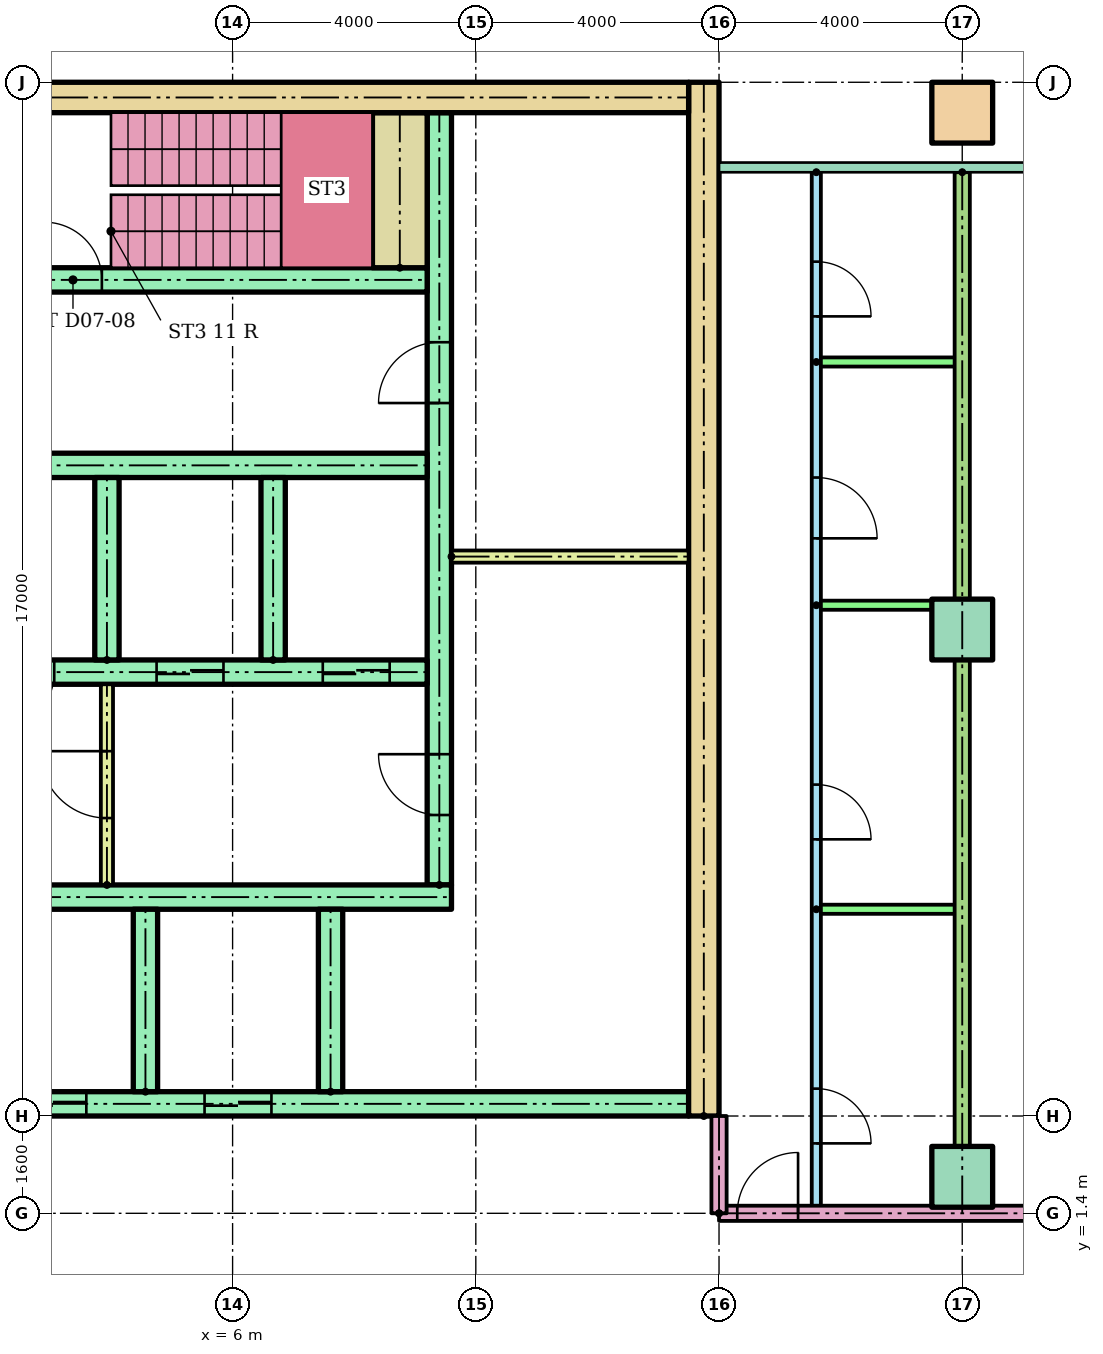
"""IFC4 building model, lengths in metres.
Left out: names, types, materials, properties, quantities, classifications, styles, units other than length and angle.
Written with IfcOpenShell. Run it as: python <this file> out.ifc"""

import sys

from ifc_helpers import new_model, si_unit, direction, frame, frame_2d, origin, origin_2d, place, context, subcontext, project, spatial, rectangle, hollow_rectangle, extrude, element, fill, save


model = new_model("IFC4")
c1 = context("Model", 3, precision=1e-05, world=origin(), true_north=direction((0.0, 1.0)))
c2 = subcontext(c1, "Body", "Model", "MODEL_VIEW")
j1 = project(units=[si_unit("LENGTHUNIT", "METRE"), si_unit("PLANEANGLEUNIT", "RADIAN")], contexts=[c1])
p1 = place(None, origin())
s1 = spatial("IfcSite", under=j1, at=p1, CompositionType="ELEMENT")
p2 = place(p1, origin())
s2 = spatial("IfcBuilding", under=s1, at=p2, CompositionType="ELEMENT")
p3 = place(p2, frame((0.0, 0.0, 29.9)))
s3 = spatial("IfcBuildingStorey", under=s2, at=p3, CompositionType="ELEMENT", Elevation=29.9)
for number, where in (
    (1, (18.0, 2.0, 0.0)),
    (2, (18.0, 11.0, 0.0)),
):
    element("IfcColumn", number, at=place(p3, frame(where)), inside=s3, PredefinedType="COLUMN", context=c2, shape_type="SweptSolid", body=[
        extrude(rectangle(XDim=1.0, YDim=1.0, at=origin_2d()), origin(), (0.0, 0.0, 1.0), 3.9),
    ])
p4 = place(p3, frame((18.0, 19.5, 0.0)))
e3 = element("IfcColumn", 3, at=p4, inside=s3, PredefinedType="COLUMN", context=c2, shape_type="SweptSolid", body=[
    extrude(hollow_rectangle(XDim=1.0, YDim=1.0, WallThickness=0.05, at=origin_2d()), origin(), (0.0, 0.0, 1.0), 3.9),
])
p5 = place(p3, frame((13.75, 3.0, 0.0), z_axis=(0.0, 0.0, 1.0), x_axis=(0.0, 1.0, 0.0)))
e4 = element("IfcWall", 4, at=p5, inside=s3, PredefinedType="SHEAR", context=c2, shape_type="SweptSolid", body=[
    extrude(rectangle(XDim=17.0, YDim=0.5, at=frame_2d((8.5, 0.0))), origin(), (0.0, 0.0, 1.0), 3.6),
])
p6 = place(p3, frame((-13.5, 19.75, 0.0)))
e5 = element("IfcWall", 5, at=p6, inside=s3, PredefinedType="SHEAR", context=c2, shape_type="SweptSolid", body=[
    extrude(rectangle(XDim=27.0, YDim=0.5, at=frame_2d((13.5, 0.0))), origin(), (0.0, 0.0, 1.0), 3.6),
])
p7 = place(p3, frame((9.4, 6.8, 0.0), z_axis=(0.0, 0.0, 1.0), x_axis=(0.0, 1.0, 0.0)))
e6 = element("IfcWall", 6, at=p7, inside=s3, PredefinedType="SHEAR", context=c2, shape_type="SweptSolid", body=[
    extrude(rectangle(XDim=12.7, YDim=0.4, at=frame_2d((6.35, 0.0))), origin(), (0.0, 0.0, 1.0), 3.6),
])
p8 = place(p7, frame((1.15, 0.0, 0.0)))
e7 = element("IfcOpeningElement", 7, at=p8, cuts=e6, PredefinedType="OPENING", context=c2, shape_type="SweptSolid", body=[
    extrude(rectangle(XDim=1.0, YDim=2.1, at=frame_2d((0.5, 1.05))), frame((0.0, 0.21, 0.0), z_axis=(0.0, -1.0, 0.0), x_axis=(1.0, 0.0, 0.0)), (0.0, 0.0, 1.0), 0.42),
])
p9 = place(p7, frame((7.925, 0.0, 0.0)))
e8 = element("IfcOpeningElement", 8, at=p9, cuts=e6, PredefinedType="OPENING", context=c2, shape_type="SweptSolid", body=[
    extrude(rectangle(XDim=1.0, YDim=2.1, at=frame_2d((0.5, 1.05))), frame((0.0, 0.21, 0.0), z_axis=(0.0, -1.0, 0.0), x_axis=(1.0, 0.0, 0.0)), (0.0, 0.0, 1.0), 0.42),
])
p10 = place(p3, frame((-13.5, 3.2, 0.0)))
e9 = element("IfcWall", 9, at=p10, inside=s3, PredefinedType="SHEAR", context=c2, shape_type="SweptSolid", body=[
    extrude(rectangle(XDim=27.0, YDim=0.4, at=frame_2d((13.5, 0.0))), origin(), (0.0, 0.0, 1.0), 3.6),
])
p11 = place(p10, frame((6.861, 0.0, 0.0)))
e10 = element("IfcOpeningElement", 10, at=p11, cuts=e9, PredefinedType="OPENING", context=c2, shape_type="SweptSolid", body=[
    extrude(rectangle(XDim=1.1, YDim=2.1, at=frame_2d((0.55, 1.05))), frame((0.0, 0.21, 0.0), z_axis=(0.0, -1.0, 0.0), x_axis=(1.0, 0.0, 0.0)), (0.0, 0.0, 1.0), 0.42),
])
p12 = place(p10, frame((9.906, 0.0, 0.0)))
e11 = element("IfcOpeningElement", 11, at=p12, cuts=e9, PredefinedType="OPENING", context=c2, shape_type="SweptSolid", body=[
    extrude(rectangle(XDim=1.1, YDim=2.1, at=frame_2d((0.55, 1.05))), frame((0.0, 0.21, 0.0), z_axis=(0.0, -1.0, 0.0), x_axis=(1.0, 0.0, 0.0)), (0.0, 0.0, 1.0), 0.42),
])
p13 = place(p10, frame((15.994, 0.0, 0.0)))
e12 = element("IfcOpeningElement", 12, at=p13, cuts=e9, PredefinedType="OPENING", context=c2, shape_type="SweptSolid", body=[
    extrude(rectangle(XDim=1.1, YDim=2.1, at=frame_2d((0.55, 1.05))), frame((0.0, 0.21, 0.0), z_axis=(0.0, -1.0, 0.0), x_axis=(1.0, 0.0, 0.0)), (0.0, 0.0, 1.0), 0.42),
])
p14 = place(p10, frame((19.039, 0.0, 0.0)))
e13 = element("IfcOpeningElement", 13, at=p14, cuts=e9, PredefinedType="OPENING", context=c2, shape_type="SweptSolid", body=[
    extrude(rectangle(XDim=1.1, YDim=2.1, at=frame_2d((0.55, 1.05))), frame((0.0, 0.21, 0.0), z_axis=(0.0, -1.0, 0.0), x_axis=(1.0, 0.0, 0.0)), (0.0, 0.0, 1.0), 0.42),
])
p15 = place(p10, frame((12.6, 0.0, 0.0)))
e14 = element("IfcOpeningElement", 14, at=p15, cuts=e9, PredefinedType="OPENING", context=c2, shape_type="SweptSolid", body=[
    extrude(rectangle(XDim=1.8, YDim=2.1, at=frame_2d((0.9, 1.05))), frame((0.0, 0.21, 0.0), z_axis=(0.0, -1.0, 0.0), x_axis=(1.0, 0.0, 0.0)), (0.0, 0.0, 1.0), 0.42),
])
p16 = place(p3, frame((1.522, 6.6, 0.0)))
e15 = element("IfcWall", 15, at=p16, inside=s3, PredefinedType="SHEAR", context=c2, shape_type="SweptSolid", body=[
    extrude(rectangle(XDim=8.078, YDim=0.4, at=frame_2d((4.039, 0.0))), origin(), (0.0, 0.0, 1.0), 3.6),
])
for number, where, z_axis, x_axis in (
    (16, (4.567, 3.4, 0.0), (0.0, 0.0, 1.0), (0.0, 1.0, 0.0)),
    (17, (7.611, 3.4, 0.0), (0.0, 0.0, 1.0), (0.0, 1.0, 0.0)),
):
    element("IfcWall", number, at=place(p3, frame(where, z_axis=z_axis, x_axis=x_axis)), inside=s3, PredefinedType="SHEAR", context=c2, shape_type="SweptSolid", body=[
        extrude(rectangle(XDim=3.0, YDim=0.4, at=frame_2d((1.5, 0.0))), origin(), (0.0, 0.0, 1.0), 3.6),
    ])
p17 = place(p3, frame((1.2, 10.3, 0.0)))
e18 = element("IfcWall", 18, at=p17, inside=s3, PredefinedType="SHEAR", context=c2, shape_type="SweptSolid", body=[
    extrude(rectangle(XDim=8.0, YDim=0.4, at=frame_2d((4.0, 0.0))), origin(), (0.0, 0.0, 1.0), 3.6),
])
p18 = place(p17, frame((3.55, 0.0, 0.0)))
e19 = element("IfcOpeningElement", 19, at=p18, cuts=e18, PredefinedType="OPENING", context=c2, shape_type="SweptSolid", body=[
    extrude(rectangle(XDim=1.1, YDim=2.1, at=frame_2d((0.55, 1.05))), frame((0.0, 0.21, 0.0), z_axis=(0.0, -1.0, 0.0), x_axis=(1.0, 0.0, 0.0)), (0.0, 0.0, 1.0), 0.42),
])
p19 = place(p17, frame((6.283, 0.0, 0.0)))
e20 = element("IfcOpeningElement", 20, at=p19, cuts=e18, PredefinedType="OPENING", context=c2, shape_type="SweptSolid", body=[
    extrude(rectangle(XDim=1.1, YDim=2.1, at=frame_2d((0.55, 1.05))), frame((0.0, 0.21, 0.0), z_axis=(0.0, -1.0, 0.0), x_axis=(1.0, 0.0, 0.0)), (0.0, 0.0, 1.0), 0.42),
])
p20 = place(p17, frame((0.867, 0.0, 0.0)))
e21 = element("IfcOpeningElement", 21, at=p20, cuts=e18, PredefinedType="OPENING", context=c2, shape_type="SweptSolid", body=[
    extrude(rectangle(XDim=1.0, YDim=2.1, at=frame_2d((0.5, 1.05))), frame((0.0, 0.21, 0.0), z_axis=(0.0, -1.0, 0.0), x_axis=(1.0, 0.0, 0.0)), (0.0, 0.0, 1.0), 0.42),
])
p21 = place(p3, frame((1.2, 13.7, 0.0)))
e22 = element("IfcWall", 22, at=p21, inside=s3, PredefinedType="SHEAR", context=c2, shape_type="SweptSolid", body=[
    extrude(rectangle(XDim=8.0, YDim=0.4, at=frame_2d((4.0, 0.0))), origin(), (0.0, 0.0, 1.0), 3.6),
])
for number, where, z_axis, x_axis in (
    (23, (3.933, 10.5, 0.0), (0.0, 0.0, 1.0), (0.0, 1.0, 0.0)),
    (24, (6.667, 10.5, 0.0), (0.0, 0.0, 1.0), (0.0, 1.0, 0.0)),
):
    element("IfcWall", number, at=place(p3, frame(where, z_axis=z_axis, x_axis=x_axis)), inside=s3, PredefinedType="SHEAR", context=c2, shape_type="SweptSolid", body=[
        extrude(rectangle(XDim=3.0, YDim=0.4, at=frame_2d((1.5, 0.0))), origin(), (0.0, 0.0, 1.0), 3.6),
    ])
p22 = place(p3, frame((3.933, 6.8, 0.0), z_axis=(0.0, 0.0, 1.0), x_axis=(0.0, 1.0, 0.0)))
e25 = element("IfcWall", 25, at=p22, inside=s3, PredefinedType="PARTITIONING", context=c2, shape_type="SweptSolid", body=[
    extrude(rectangle(XDim=3.3, YDim=0.2, at=frame_2d((1.65, 0.0))), origin(), (0.0, 0.0, 1.0), 3.6),
])
p23 = place(p22, frame((1.1, 0.0, 0.0)))
e26 = element("IfcOpeningElement", 26, at=p23, cuts=e25, PredefinedType="OPENING", context=c2, shape_type="SweptSolid", body=[
    extrude(rectangle(XDim=1.1, YDim=2.1, at=frame_2d((0.55, 1.05))), frame((0.0, 0.11, 0.0), z_axis=(0.0, -1.0, 0.0), x_axis=(1.0, 0.0, 0.0)), (0.0, 0.0, 1.0), 0.22),
])
p24 = place(p3, frame((-9.2, 16.75, 0.0)))
e27 = element("IfcWall", 27, at=p24, inside=s3, PredefinedType="SHEAR", context=c2, shape_type="SweptSolid", body=[
    extrude(rectangle(XDim=18.4, YDim=0.4, at=frame_2d((9.2, 0.0))), origin(), (0.0, 0.0, 1.0), 3.6),
])
p25 = place(p24, frame((0.1, 0.0, 0.0)))
e28 = element("IfcOpeningElement", 28, at=p25, cuts=e27, PredefinedType="OPENING", context=c2, shape_type="SweptSolid", body=[
    extrude(rectangle(XDim=0.95, YDim=2.1, at=frame_2d((0.475, 1.05))), frame((0.0, 0.21, 0.0), z_axis=(0.0, -1.0, 0.0), x_axis=(1.0, 0.0, 0.0)), (0.0, 0.0, 1.0), 0.42),
])
p26 = place(p24, frame((6.1, 0.0, 0.0)))
e29 = element("IfcOpeningElement", 29, at=p26, cuts=e27, PredefinedType="OPENING", context=c2, shape_type="SweptSolid", body=[
    extrude(rectangle(XDim=0.95, YDim=2.1, at=frame_2d((0.475, 1.05))), frame((0.0, 0.21, 0.0), z_axis=(0.0, -1.0, 0.0), x_axis=(1.0, 0.0, 0.0)), (0.0, 0.0, 1.0), 0.42),
])
p27 = place(p24, frame((12.1, 0.0, 0.0)))
e30 = element("IfcOpeningElement", 30, at=p27, cuts=e27, PredefinedType="OPENING", context=c2, shape_type="SweptSolid", body=[
    extrude(rectangle(XDim=0.95, YDim=2.1, at=frame_2d((0.475, 1.05))), frame((0.0, 0.21, 0.0), z_axis=(0.0, -1.0, 0.0), x_axis=(1.0, 0.0, 0.0)), (0.0, 0.0, 1.0), 0.42),
])
p28 = place(p3, frame((8.75, 16.95, 0.0), z_axis=(0.0, 0.0, 1.0), x_axis=(0.0, 1.0, 0.0)))
e31 = element("IfcWall", 31, at=p28, inside=s3, PredefinedType="SHEAR", context=c2, shape_type="SweptSolid", body=[
    extrude(rectangle(XDim=2.55, YDim=0.9, at=frame_2d((1.275, 0.0))), origin(), (0.0, 0.0, 1.0), 3.6),
])
p29 = place(p3, frame((9.6, 12.2, 0.0)))
e32 = element("IfcWall", 32, at=p29, inside=s3, PredefinedType="PARTITIONING", context=c2, shape_type="SweptSolid", body=[
    extrude(rectangle(XDim=3.9, YDim=0.2, at=frame_2d((1.95, 0.0))), origin(), (0.0, 0.0, 1.0), 3.6),
])
p30 = place(p3, frame((14.0, 1.4, 0.0)))
e33 = element("IfcWall", 33, at=p30, inside=s3, PredefinedType="PARTITIONING", context=c2, shape_type="SweptSolid", body=[
    extrude(rectangle(XDim=15.0, YDim=0.25, at=frame_2d((7.5, 0.0))), origin(), (0.0, 0.0, 1.0), 3.1),
])
p31 = place(p30, frame((0.3, 0.0, 0.0)))
e34 = element("IfcOpeningElement", 34, at=p31, cuts=e33, PredefinedType="OPENING", context=c2, shape_type="SweptSolid", body=[
    extrude(rectangle(XDim=1.0, YDim=2.1, at=frame_2d((0.5, 1.05))), frame((0.0, 0.135, 0.0), z_axis=(0.0, -1.0, 0.0), x_axis=(1.0, 0.0, 0.0)), (0.0, 0.0, 1.0), 0.27),
])
p32 = place(p30, frame((5.5, 0.0, 0.0)))
e35 = element("IfcOpeningElement", 35, at=p32, cuts=e33, PredefinedType="OPENING", context=c2, shape_type="SweptSolid", body=[
    extrude(rectangle(XDim=1.0, YDim=2.1, at=frame_2d((0.5, 1.05))), frame((0.0, 0.135, 0.0), z_axis=(0.0, -1.0, 0.0), x_axis=(1.0, 0.0, 0.0)), (0.0, 0.0, 1.0), 0.27),
])
p33 = place(p30, frame((13.5, 0.0, 0.0)))
e36 = element("IfcOpeningElement", 36, at=p33, cuts=e33, PredefinedType="OPENING", context=c2, shape_type="SweptSolid", body=[
    extrude(rectangle(XDim=1.0, YDim=2.1, at=frame_2d((0.5, 1.05))), frame((0.0, 0.135, 0.0), z_axis=(0.0, -1.0, 0.0), x_axis=(1.0, 0.0, 0.0)), (0.0, 0.0, 1.0), 0.27),
])
p34 = place(p3, frame((15.6, 18.521, 0.0), z_axis=(0.0, 0.0, 1.0), x_axis=(0.0, -1.0, 0.0)))
e37 = element("IfcWall", 37, at=p34, inside=s3, PredefinedType="PARTITIONING", context=c2, shape_type="SweptSolid", body=[
    extrude(rectangle(XDim=17.121, YDim=0.15, at=frame_2d((8.561, 0.0))), origin(), (0.0, 0.0, 1.0), 3.1),
])
p35 = place(p34, frame((15.071, 0.0, 0.0)))
e38 = element("IfcOpeningElement", 38, at=p35, cuts=e37, PredefinedType="OPENING", context=c2, shape_type="SweptSolid", body=[
    extrude(rectangle(XDim=0.9, YDim=2.1, at=frame_2d((0.45, 1.05))), frame((0.0, 0.085, 0.0), z_axis=(0.0, -1.0, 0.0), x_axis=(1.0, 0.0, 0.0)), (0.0, 0.0, 1.0), 0.17),
])
p36 = place(p34, frame((10.071, 0.0, 0.0)))
e39 = element("IfcOpeningElement", 39, at=p36, cuts=e37, PredefinedType="OPENING", context=c2, shape_type="SweptSolid", body=[
    extrude(rectangle(XDim=0.9, YDim=2.1, at=frame_2d((0.45, 1.05))), frame((0.0, 0.085, 0.0), z_axis=(0.0, -1.0, 0.0), x_axis=(1.0, 0.0, 0.0)), (0.0, 0.0, 1.0), 0.17),
])
p37 = place(p34, frame((5.021, 0.0, 0.0)))
e40 = element("IfcOpeningElement", 40, at=p37, cuts=e37, PredefinedType="OPENING", context=c2, shape_type="SweptSolid", body=[
    extrude(rectangle(XDim=1.0, YDim=2.1, at=frame_2d((0.5, 1.05))), frame((0.0, 0.085, 0.0), z_axis=(0.0, -1.0, 0.0), x_axis=(1.0, 0.0, 0.0)), (0.0, 0.0, 1.0), 0.17),
])
p38 = place(p34, frame((1.471, 0.0, 0.0)))
e41 = element("IfcOpeningElement", 41, at=p38, cuts=e37, PredefinedType="OPENING", context=c2, shape_type="SweptSolid", body=[
    extrude(rectangle(XDim=0.9, YDim=2.1, at=frame_2d((0.45, 1.05))), frame((0.0, 0.085, 0.0), z_axis=(0.0, -1.0, 0.0), x_axis=(1.0, 0.0, 0.0)), (0.0, 0.0, 1.0), 0.17),
])
for number, where in (
    (42, (15.6, 6.4, 0.0)),
    (43, (15.6, 11.4, 0.0)),
    (44, (15.6, 15.4, 0.0)),
):
    element("IfcWall", number, at=place(p3, frame(where)), inside=s3, PredefinedType="PARTITIONING", context=c2, shape_type="SweptSolid", body=[
        extrude(rectangle(XDim=2.4, YDim=0.15, at=frame_2d((1.2, 0.0))), origin(), (0.0, 0.0, 1.0), 3.1),
    ])
p39 = place(p3, frame((18.0, 18.521, 0.0), z_axis=(0.0, 0.0, 1.0), x_axis=(0.0, -1.0, 0.0)))
e45 = element("IfcWall", 45, at=p39, inside=s3, PredefinedType="PARTITIONING", context=c2, shape_type="SweptSolid", body=[
    extrude(rectangle(XDim=17.121, YDim=0.25, at=frame_2d((8.561, 0.0))), origin(), (0.0, 0.0, 1.0), 3.1),
])
p40 = place(p3, frame((14.0, 1.4, 0.0), z_axis=(0.0, 0.0, 1.0), x_axis=(0.0, 1.0, 0.0)))
e46 = element("IfcWall", 46, at=p40, inside=s3, PredefinedType="PARTITIONING", context=c2, shape_type="SweptSolid", body=[
    extrude(rectangle(XDim=1.6, YDim=0.25, at=frame_2d((0.8, 0.0))), origin(), (0.0, 0.0, 1.0), 3.1),
])
p41 = place(p13, origin())
e47 = element("IfcDoor", 47, at=p41, inside=s3, OperationType="SLIDING_TO_LEFT", PredefinedType="DOOR", context=c2, shape_type="SweptSolid", body=[
    extrude(rectangle(XDim=1.1, YDim=2.1, at=frame_2d((0.55, 1.05))), frame((0.0, 0.025, 0.0), z_axis=(0.0, -1.0, 0.0), x_axis=(1.0, 0.0, 0.0)), (0.0, 0.0, 1.0), 0.05),
])
fill(e12, e47)
p42 = place(p14, origin())
e48 = element("IfcDoor", 48, at=p42, inside=s3, OperationType="SLIDING_TO_LEFT", PredefinedType="DOOR", context=c2, shape_type="SweptSolid", body=[
    extrude(rectangle(XDim=1.1, YDim=2.1, at=frame_2d((0.55, 1.05))), frame((0.0, 0.025, 0.0), z_axis=(0.0, -1.0, 0.0), x_axis=(1.0, 0.0, 0.0)), (0.0, 0.0, 1.0), 0.05),
])
fill(e13, e48)
p43 = place(p18, origin())
e49 = element("IfcDoor", 49, at=p43, inside=s3, OperationType="SLIDING_TO_LEFT", PredefinedType="DOOR", context=c2, shape_type="SweptSolid", body=[
    extrude(rectangle(XDim=1.1, YDim=2.1, at=frame_2d((0.55, 1.05))), frame((0.0, 0.025, 0.0), z_axis=(0.0, -1.0, 0.0), x_axis=(1.0, 0.0, 0.0)), (0.0, 0.0, 1.0), 0.05),
])
fill(e19, e49)
p44 = place(p19, origin())
e50 = element("IfcDoor", 50, at=p44, inside=s3, OperationType="SLIDING_TO_LEFT", PredefinedType="DOOR", context=c2, shape_type="SweptSolid", body=[
    extrude(rectangle(XDim=1.1, YDim=2.1, at=frame_2d((0.55, 1.05))), frame((0.0, 0.025, 0.0), z_axis=(0.0, -1.0, 0.0), x_axis=(1.0, 0.0, 0.0)), (0.0, 0.0, 1.0), 0.05),
])
fill(e20, e50)
p45 = place(p20, frame((1.0, 0.0, 0.0), z_axis=(0.0, 0.0, 1.0), x_axis=(-1.0, 0.0, 0.0)))
e51 = element("IfcDoor", 51, at=p45, inside=s3, OperationType="SINGLE_SWING_LEFT", PredefinedType="DOOR", context=c2, shape_type="SweptSolid", body=[
    extrude(rectangle(XDim=1.0, YDim=2.1, at=frame_2d((0.5, 1.05))), frame((0.0, 0.025, 0.0), z_axis=(0.0, -1.0, 0.0), x_axis=(1.0, 0.0, 0.0)), (0.0, 0.0, 1.0), 0.05),
])
fill(e21, e51)
p46 = place(p23, origin())
e52 = element("IfcDoor", 52, at=p46, inside=s3, OperationType="SINGLE_SWING_RIGHT", PredefinedType="DOOR", context=c2, shape_type="SweptSolid", body=[
    extrude(rectangle(XDim=1.1, YDim=2.1, at=frame_2d((0.55, 1.05))), frame((0.0, 0.025, 0.0), z_axis=(0.0, -1.0, 0.0), x_axis=(1.0, 0.0, 0.0)), (0.0, 0.0, 1.0), 0.05),
])
fill(e26, e52)
p47 = place(p27, origin())
e53 = element("IfcDoor", 53, at=p47, inside=s3, OperationType="SINGLE_SWING_LEFT", PredefinedType="DOOR", context=c2, shape_type="SweptSolid", body=[
    extrude(rectangle(XDim=0.95, YDim=2.1, at=frame_2d((0.475, 1.05))), frame((0.0, 0.025, 0.0), z_axis=(0.0, -1.0, 0.0), x_axis=(1.0, 0.0, 0.0)), (0.0, 0.0, 1.0), 0.05),
])
fill(e30, e53)
p48 = place(p8, origin())
e54 = element("IfcDoor", 54, at=p48, inside=s3, OperationType="SINGLE_SWING_RIGHT", PredefinedType="DOOR", context=c2, shape_type="SweptSolid", body=[
    extrude(rectangle(XDim=1.0, YDim=2.1, at=frame_2d((0.5, 1.05))), frame((0.0, 0.025, 0.0), z_axis=(0.0, -1.0, 0.0), x_axis=(1.0, 0.0, 0.0)), (0.0, 0.0, 1.0), 0.05),
])
fill(e7, e54)
p49 = place(p9, origin())
e55 = element("IfcDoor", 55, at=p49, inside=s3, OperationType="SINGLE_SWING_LEFT", PredefinedType="DOOR", context=c2, shape_type="SweptSolid", body=[
    extrude(rectangle(XDim=1.0, YDim=2.1, at=frame_2d((0.5, 1.05))), frame((0.0, 0.025, 0.0), z_axis=(0.0, -1.0, 0.0), x_axis=(1.0, 0.0, 0.0)), (0.0, 0.0, 1.0), 0.05),
])
fill(e8, e55)
p50 = place(p35, origin())
e56 = element("IfcDoor", 56, at=p50, inside=s3, OperationType="SINGLE_SWING_RIGHT", PredefinedType="DOOR", context=c2, shape_type="SweptSolid", body=[
    extrude(rectangle(XDim=0.9, YDim=2.1, at=frame_2d((0.45, 1.05))), frame((0.0, 0.025, 0.0), z_axis=(0.0, -1.0, 0.0), x_axis=(1.0, 0.0, 0.0)), (0.0, 0.0, 1.0), 0.05),
])
fill(e38, e56)
p51 = place(p36, origin())
e57 = element("IfcDoor", 57, at=p51, inside=s3, OperationType="SINGLE_SWING_RIGHT", PredefinedType="DOOR", context=c2, shape_type="SweptSolid", body=[
    extrude(rectangle(XDim=0.9, YDim=2.1, at=frame_2d((0.45, 1.05))), frame((0.0, 0.025, 0.0), z_axis=(0.0, -1.0, 0.0), x_axis=(1.0, 0.0, 0.0)), (0.0, 0.0, 1.0), 0.05),
])
fill(e39, e57)
p52 = place(p37, origin())
e58 = element("IfcDoor", 58, at=p52, inside=s3, OperationType="SINGLE_SWING_RIGHT", PredefinedType="DOOR", context=c2, shape_type="SweptSolid", body=[
    extrude(rectangle(XDim=1.0, YDim=2.1, at=frame_2d((0.5, 1.05))), frame((0.0, 0.025, 0.0), z_axis=(0.0, -1.0, 0.0), x_axis=(1.0, 0.0, 0.0)), (0.0, 0.0, 1.0), 0.05),
])
fill(e40, e58)
p53 = place(p38, origin())
e59 = element("IfcDoor", 59, at=p53, inside=s3, OperationType="SINGLE_SWING_RIGHT", PredefinedType="DOOR", context=c2, shape_type="SweptSolid", body=[
    extrude(rectangle(XDim=0.9, YDim=2.1, at=frame_2d((0.45, 1.05))), frame((0.0, 0.025, 0.0), z_axis=(0.0, -1.0, 0.0), x_axis=(1.0, 0.0, 0.0)), (0.0, 0.0, 1.0), 0.05),
])
fill(e41, e59)
p54 = place(p31, origin())
e60 = element("IfcDoor", 60, at=p54, inside=s3, OperationType="SINGLE_SWING_RIGHT", PredefinedType="DOOR", context=c2, shape_type="SweptSolid", body=[
    extrude(rectangle(XDim=1.0, YDim=2.1, at=frame_2d((0.5, 1.05))), frame((0.0, 0.025, 0.0), z_axis=(0.0, -1.0, 0.0), x_axis=(1.0, 0.0, 0.0)), (0.0, 0.0, 1.0), 0.05),
])
fill(e34, e60)
save(model, sys.argv[1])
